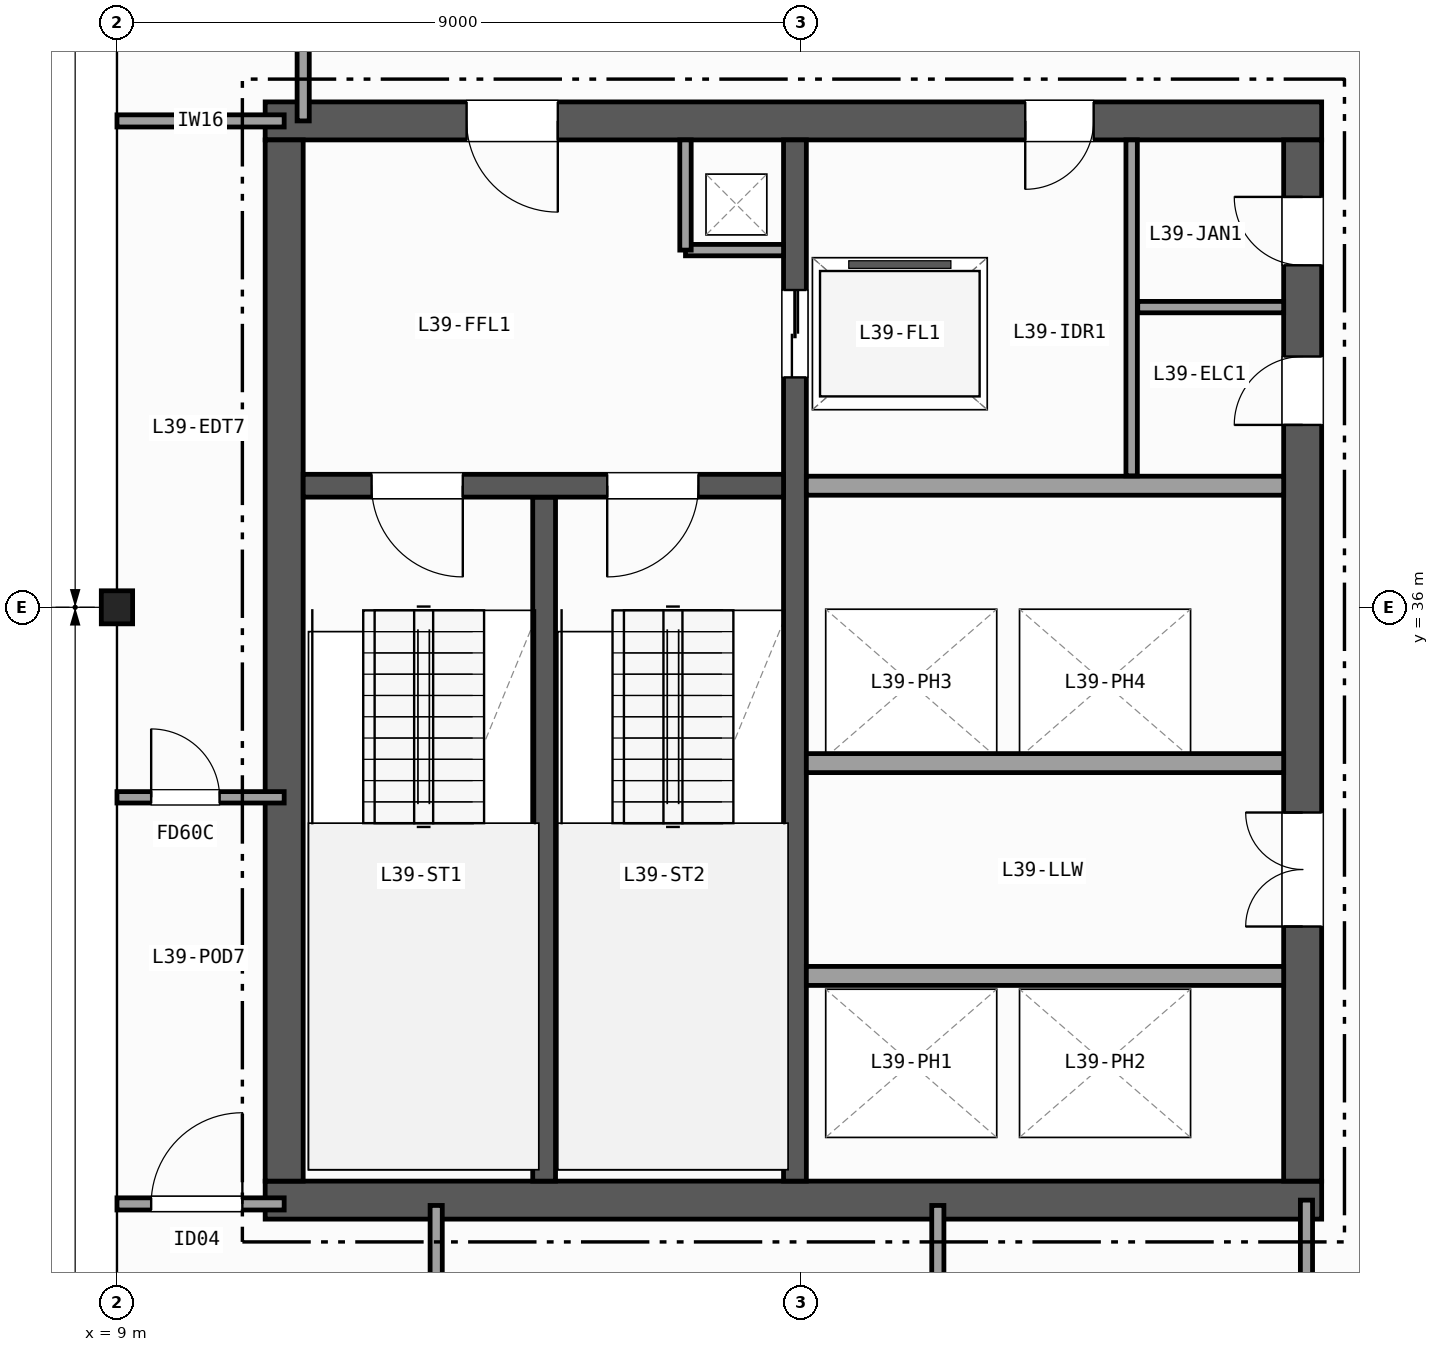
"""IFC4 building model, lengths in metres.
Left out: names, types, materials, properties, quantities, classifications, styles, units other than length and angle.
Written with IfcOpenShell. Run it as: python <this file> out.ifc"""

import sys

from ifc_helpers import new_model, si_unit, direction, frame, frame_2d, origin, origin_2d, place, context, subcontext, project, spatial, rectangle, i_section, extrude, element, fill, save


model = new_model("IFC4")
c1 = context("Model", 3, precision=1e-05, world=origin(), true_north=direction((0.0, 1.0)))
c2 = subcontext(c1, "Body", "Model", "MODEL_VIEW")
j1 = project(units=[si_unit("LENGTHUNIT", "METRE"), si_unit("PLANEANGLEUNIT", "RADIAN")], contexts=[c1])
p1 = place(None, origin())
s1 = spatial("IfcSite", under=j1, at=p1, CompositionType="ELEMENT")
p2 = place(p1, origin())
s2 = spatial("IfcBuilding", under=s1, at=p2, CompositionType="ELEMENT")
p3 = place(p2, frame((0.0, 0.0, 158.1)))
s3 = spatial("IfcBuildingStorey", under=s2, at=p3, CompositionType="ELEMENT", Elevation=158.1)
p4 = place(p3, frame((9.0, 36.0, 0.0), z_axis=(0.0, 0.0, 1.0), x_axis=(1.0, 0.0, 0.0)))
e1 = element("IfcColumn", 1, at=p4, inside=s3, PredefinedType="COLUMN", context=c2, shape_type="SweptSolid", body=[
    extrude(i_section(OverallWidth=0.412, OverallDepth=0.435, WebThickness=0.036, FlangeThickness=0.057, FilletRadius=0.015, at=origin_2d()), origin(), (0.0, 0.0, 1.0), 3.7),
])
p5 = place(p3, frame((10.95, 28.2, 0.0), z_axis=(0.0, 0.0, 1.0), x_axis=(1.0, 0.0, 0.0)))
e2 = element("IfcWall", 2, at=p5, inside=s3, PredefinedType="SHEAR", context=c2, shape_type="SweptSolid", body=[
    extrude(rectangle(XDim=13.9, YDim=0.5, at=frame_2d((6.95, 0.0))), origin(), (0.0, 0.0, 1.0), 3.42),
])
p6 = place(p3, frame((24.85, 42.4, 0.0), z_axis=(0.0, 0.0, 1.0), x_axis=(-1.0, 0.0, 0.0)))
e3 = element("IfcWall", 3, at=p6, inside=s3, PredefinedType="SHEAR", context=c2, shape_type="SweptSolid", body=[
    extrude(rectangle(XDim=13.9, YDim=0.5, at=frame_2d((6.95, 0.0))), origin(), (0.0, 0.0, 1.0), 3.42),
])
p7 = place(p6, frame((10.05, 0.0, 0.0)))
e4 = element("IfcOpeningElement", 4, at=p7, cuts=e3, PredefinedType="OPENING", context=c2, shape_type="SweptSolid", body=[
    extrude(rectangle(XDim=1.2, YDim=2.15, at=frame_2d((0.6, 1.075))), frame((0.0, 0.26, 0.0), z_axis=(0.0, -1.0, 0.0), x_axis=(1.0, 0.0, 0.0)), (0.0, 0.0, 1.0), 0.52),
])
p8 = place(p6, frame((3.0, 0.0, 0.0)))
e5 = element("IfcOpeningElement", 5, at=p8, cuts=e3, PredefinedType="OPENING", context=c2, shape_type="SweptSolid", body=[
    extrude(rectangle(XDim=0.9, YDim=2.1, at=frame_2d((0.45, 1.05))), frame((0.0, 0.26, 0.0), z_axis=(0.0, -1.0, 0.0), x_axis=(1.0, 0.0, 0.0)), (0.0, 0.0, 1.0), 0.52),
])
p9 = place(p3, frame((11.2, 42.15, 0.0), z_axis=(0.0, 0.0, 1.0), x_axis=(0.0, -1.0, 0.0)))
e6 = element("IfcWall", 6, at=p9, inside=s3, PredefinedType="SHEAR", context=c2, shape_type="SweptSolid", body=[
    extrude(rectangle(XDim=13.7, YDim=0.5, at=frame_2d((6.85, 0.0))), origin(), (0.0, 0.0, 1.0), 3.42),
])
p10 = place(p3, frame((24.6, 28.45, 0.0), z_axis=(0.0, 0.0, 1.0), x_axis=(0.0, 1.0, 0.0)))
e7 = element("IfcWall", 7, at=p10, inside=s3, PredefinedType="SHEAR", context=c2, shape_type="SweptSolid", body=[
    extrude(rectangle(XDim=13.7, YDim=0.5, at=frame_2d((6.85, 0.0))), origin(), (0.0, 0.0, 1.0), 3.42),
])
p11 = place(p10, frame((3.35, 0.0, 0.0)))
e8 = element("IfcOpeningElement", 8, at=p11, cuts=e7, PredefinedType="OPENING", context=c2, shape_type="SweptSolid", body=[
    extrude(rectangle(XDim=1.5, YDim=2.2, at=frame_2d((0.75, 1.1))), frame((0.0, 0.26, 0.0), z_axis=(0.0, -1.0, 0.0), x_axis=(1.0, 0.0, 0.0)), (0.0, 0.0, 1.0), 0.52),
])
p12 = place(p10, frame((9.95, 0.0, 0.0)))
e9 = element("IfcOpeningElement", 9, at=p12, cuts=e7, PredefinedType="OPENING", context=c2, shape_type="SweptSolid", body=[
    extrude(rectangle(XDim=0.9, YDim=2.1, at=frame_2d((0.45, 1.05))), frame((0.0, 0.26, 0.0), z_axis=(0.0, -1.0, 0.0), x_axis=(1.0, 0.0, 0.0)), (0.0, 0.0, 1.0), 0.52),
])
p13 = place(p10, frame((12.05, 0.0, 0.0)))
e10 = element("IfcOpeningElement", 10, at=p13, cuts=e7, PredefinedType="OPENING", context=c2, shape_type="SweptSolid", body=[
    extrude(rectangle(XDim=0.9, YDim=2.1, at=frame_2d((0.45, 1.05))), frame((0.0, 0.26, 0.0), z_axis=(0.0, -1.0, 0.0), x_axis=(1.0, 0.0, 0.0)), (0.0, 0.0, 1.0), 0.52),
])
p14 = place(p3, frame((14.62, 28.45, 0.0), z_axis=(0.0, 0.0, 1.0), x_axis=(0.0, 1.0, 0.0)))
e11 = element("IfcWall", 11, at=p14, inside=s3, PredefinedType="SHEAR", context=c2, shape_type="SweptSolid", body=[
    extrude(rectangle(XDim=9.0, YDim=0.3, at=frame_2d((4.5, 0.0))), origin(), (0.0, 0.0, 1.0), 3.42),
])
p15 = place(p3, frame((17.92, 42.15, 0.0), z_axis=(0.0, 0.0, 1.0), x_axis=(0.0, -1.0, 0.0)))
e12 = element("IfcWall", 12, at=p15, inside=s3, PredefinedType="SHEAR", context=c2, shape_type="SweptSolid", body=[
    extrude(rectangle(XDim=13.7, YDim=0.3, at=frame_2d((6.85, 0.0))), origin(), (0.0, 0.0, 1.0), 3.42),
])
p16 = place(p15, frame((1.975, 0.0, 0.0)))
e13 = element("IfcOpeningElement", 13, at=p16, cuts=e12, PredefinedType="OPENING", context=c2, shape_type="SweptSolid", body=[
    extrude(rectangle(XDim=1.15, YDim=2.15, at=frame_2d((0.575, 1.075))), frame((0.0, 0.16, 0.0), z_axis=(0.0, -1.0, 0.0), x_axis=(1.0, 0.0, 0.0)), (0.0, 0.0, 1.0), 0.32),
])
p17 = place(p3, frame((17.77, 37.6, 0.0), z_axis=(0.0, 0.0, 1.0), x_axis=(-1.0, 0.0, 0.0)))
e14 = element("IfcWall", 14, at=p17, inside=s3, PredefinedType="SHEAR", context=c2, shape_type="SweptSolid", body=[
    extrude(rectangle(XDim=6.32, YDim=0.3, at=frame_2d((3.16, 0.0))), origin(), (0.0, 0.0, 1.0), 3.42),
])
p18 = place(p17, frame((4.22, 0.0, 0.0)))
e15 = element("IfcOpeningElement", 15, at=p18, cuts=e14, PredefinedType="OPENING", context=c2, shape_type="SweptSolid", body=[
    extrude(rectangle(XDim=1.2, YDim=2.15, at=frame_2d((0.6, 1.075))), frame((0.0, 0.16, 0.0), z_axis=(0.0, -1.0, 0.0), x_axis=(1.0, 0.0, 0.0)), (0.0, 0.0, 1.0), 0.32),
])
p19 = place(p17, frame((1.12, 0.0, 0.0)))
e16 = element("IfcOpeningElement", 16, at=p19, cuts=e14, PredefinedType="OPENING", context=c2, shape_type="SweptSolid", body=[
    extrude(rectangle(XDim=1.2, YDim=2.15, at=frame_2d((0.6, 1.075))), frame((0.0, 0.16, 0.0), z_axis=(0.0, -1.0, 0.0), x_axis=(1.0, 0.0, 0.0)), (0.0, 0.0, 1.0), 0.32),
])
p20 = place(p3, frame((16.48, 40.7, 0.0), z_axis=(0.0, 0.0, 1.0), x_axis=(1.0, 0.0, 0.0)))
e17 = element("IfcWall", 17, at=p20, inside=s3, PredefinedType="PARTITIONING", context=c2, shape_type="SweptSolid", body=[
    extrude(rectangle(XDim=1.29, YDim=0.15, at=frame_2d((0.645, 0.0))), origin(), (0.0, 0.0, 1.0), 3.42),
])
p21 = place(p3, frame((16.48, 40.7, 0.0), z_axis=(0.0, 0.0, 1.0), x_axis=(0.0, 1.0, 0.0)))
e18 = element("IfcWall", 18, at=p21, inside=s3, PredefinedType="PARTITIONING", context=c2, shape_type="SweptSolid", body=[
    extrude(rectangle(XDim=1.45, YDim=0.15, at=frame_2d((0.725, 0.0))), origin(), (0.0, 0.0, 1.0), 3.42),
])
for number, where, z_axis, x_axis in (
    (19, (18.07, 37.6, 0.0), (0.0, 0.0, 1.0), (1.0, 0.0, 0.0)),
    (20, (18.07, 31.15, 0.0), (0.0, 0.0, 1.0), (1.0, 0.0, 0.0)),
    (21, (24.35, 33.95, 0.0), (0.0, 0.0, 1.0), (-1.0, 0.0, 0.0)),
):
    element("IfcWall", number, at=place(p3, frame(where, z_axis=z_axis, x_axis=x_axis)), inside=s3, PredefinedType="PARTITIONING", context=c2, shape_type="SweptSolid", body=[
        extrude(rectangle(XDim=6.28, YDim=0.25, at=frame_2d((3.14, 0.0))), origin(), (0.0, 0.0, 1.0), 3.42),
    ])
p22 = place(p3, frame((22.35, 37.73, 0.0), z_axis=(0.0, 0.0, 1.0), x_axis=(0.0, 1.0, 0.0)))
e22 = element("IfcWall", 22, at=p22, inside=s3, PredefinedType="PARTITIONING", context=c2, shape_type="SweptSolid", body=[
    extrude(rectangle(XDim=4.42, YDim=0.15, at=frame_2d((2.21, 0.0))), origin(), (0.0, 0.0, 1.0), 3.42),
])
p23 = place(p3, frame((22.43, 39.95, 0.0), z_axis=(0.0, 0.0, 1.0), x_axis=(1.0, 0.0, 0.0)))
e23 = element("IfcWall", 23, at=p23, inside=s3, PredefinedType="PARTITIONING", context=c2, shape_type="SweptSolid", body=[
    extrude(rectangle(XDim=1.92, YDim=0.15, at=frame_2d((0.96, 0.0))), origin(), (0.0, 0.0, 1.0), 3.42),
])
p24 = place(p3, frame((9.0, 28.15, 0.0), z_axis=(0.0, 0.0, 1.0), x_axis=(1.0, 0.0, 0.0)))
e24 = element("IfcWall", 24, at=p24, inside=s3, PredefinedType="PARTITIONING", context=c2, shape_type="SweptSolid", body=[
    extrude(rectangle(XDim=2.2, YDim=0.16, at=frame_2d((1.1, 0.0))), origin(), (0.0, 0.0, 1.0), 2.634),
])
p25 = place(p24, frame((0.45, 0.0, 0.0)))
e25 = element("IfcOpeningElement", 25, at=p25, cuts=e24, PredefinedType="OPENING", context=c2, shape_type="SweptSolid", body=[
    extrude(rectangle(XDim=1.2, YDim=2.15, at=frame_2d((0.6, 1.075))), frame((0.0, 0.09, 0.0), z_axis=(0.0, -1.0, 0.0), x_axis=(1.0, 0.0, 0.0)), (0.0, 0.0, 1.0), 0.18),
])
p26 = place(p3, frame((9.0, 42.4, 0.0), z_axis=(0.0, 0.0, 1.0), x_axis=(1.0, 0.0, 0.0)))
e26 = element("IfcWall", 26, at=p26, inside=s3, PredefinedType="PARTITIONING", context=c2, shape_type="SweptSolid", body=[
    extrude(rectangle(XDim=2.2, YDim=0.16, at=frame_2d((1.1, 0.0))), origin(), (0.0, 0.0, 1.0), 2.634),
])
p27 = place(p3, frame((11.45, 42.4, 0.0), z_axis=(0.0, 0.0, 1.0), x_axis=(0.0, 1.0, 0.0)))
e27 = element("IfcWall", 27, at=p27, inside=s3, PredefinedType="PARTITIONING", context=c2, shape_type="SweptSolid", body=[
    extrude(rectangle(XDim=2.1, YDim=0.16, at=frame_2d((1.05, 0.0))), origin(), (0.0, 0.0, 1.0), 3.42),
])
p28 = place(p3, frame((9.0, 33.5, 0.0), z_axis=(0.0, 0.0, 1.0), x_axis=(1.0, 0.0, 0.0)))
e28 = element("IfcWall", 28, at=p28, inside=s3, PredefinedType="PARTITIONING", context=c2, shape_type="SweptSolid", body=[
    extrude(rectangle(XDim=2.2, YDim=0.15, at=frame_2d((1.1, 0.0))), origin(), (0.0, 0.0, 1.0), 2.634),
])
p29 = place(p28, frame((0.45, 0.0, 0.0)))
e29 = element("IfcOpeningElement", 29, at=p29, cuts=e28, PredefinedType="OPENING", context=c2, shape_type="SweptSolid", body=[
    extrude(rectangle(XDim=0.9, YDim=2.1, at=frame_2d((0.45, 1.05))), frame((0.0, 0.085, 0.0), z_axis=(0.0, -1.0, 0.0), x_axis=(1.0, 0.0, 0.0)), (0.0, 0.0, 1.0), 0.17),
])
p30 = place(p3, frame((24.65, 9.0, 0.0), z_axis=(0.0, 0.0, 1.0), x_axis=(0.0, 1.0, 0.0)))
e30 = element("IfcWall", 30, at=p30, inside=s3, PredefinedType="PARTITIONING", context=c2, shape_type="SweptSolid", body=[
    extrude(rectangle(XDim=19.2, YDim=0.16, at=frame_2d((9.6, 0.0))), origin(), (0.0, 0.0, 1.0), 2.634),
])
p31 = place(p30, frame((12.2, 0.0, 0.0)))
e31 = element("IfcOpeningElement", 31, at=p31, cuts=e30, PredefinedType="OPENING", context=c2, shape_type="SweptSolid", body=[
    extrude(rectangle(XDim=0.95, YDim=2.1, at=frame_2d((0.475, 1.05))), frame((0.0, 0.09, 0.0), z_axis=(0.0, -1.0, 0.0), x_axis=(1.0, 0.0, 0.0)), (0.0, 0.0, 1.0), 0.18),
])
p32 = place(p30, frame((4.2, 0.0, 0.0)))
e32 = element("IfcOpeningElement", 32, at=p32, cuts=e30, PredefinedType="OPENING", context=c2, shape_type="SweptSolid", body=[
    extrude(rectangle(XDim=1.0, YDim=2.1, at=frame_2d((0.5, 1.05))), frame((0.0, 0.09, 0.0), z_axis=(0.0, -1.0, 0.0), x_axis=(1.0, 0.0, 0.0)), (0.0, 0.0, 1.0), 0.18),
])
p33 = place(p3, frame((13.2, 18.0, 0.0), z_axis=(0.0, 0.0, 1.0), x_axis=(0.0, 1.0, 0.0)))
e33 = element("IfcWall", 33, at=p33, inside=s3, PredefinedType="PARTITIONING", context=c2, shape_type="SweptSolid", body=[
    extrude(rectangle(XDim=10.13, YDim=0.16, at=frame_2d((5.065, 0.0))), origin(), (0.0, 0.0, 1.0), 2.789),
])
p34 = place(p33, frame((2.5, 0.0, 0.0)))
e34 = element("IfcOpeningElement", 34, at=p34, cuts=e33, PredefinedType="OPENING", context=c2, shape_type="SweptSolid", body=[
    extrude(rectangle(XDim=1.05, YDim=2.15, at=frame_2d((0.525, 1.075))), frame((0.0, 0.09, 0.0), z_axis=(0.0, -1.0, 0.0), x_axis=(1.0, 0.0, 0.0)), (0.0, 0.0, 1.0), 0.18),
])
p35 = place(p3, frame((19.8, 18.0, 0.0), z_axis=(0.0, 0.0, 1.0), x_axis=(0.0, 1.0, 0.0)))
e35 = element("IfcWall", 35, at=p35, inside=s3, PredefinedType="PARTITIONING", context=c2, shape_type="SweptSolid", body=[
    extrude(rectangle(XDim=10.13, YDim=0.16, at=frame_2d((5.065, 0.0))), origin(), (0.0, 0.0, 1.0), 2.789),
])
p36 = place(p35, frame((2.5, 0.0, 0.0)))
e36 = element("IfcOpeningElement", 36, at=p36, cuts=e35, PredefinedType="OPENING", context=c2, shape_type="SweptSolid", body=[
    extrude(rectangle(XDim=1.2, YDim=2.15, at=frame_2d((0.6, 1.075))), frame((0.0, 0.09, 0.0), z_axis=(0.0, -1.0, 0.0), x_axis=(1.0, 0.0, 0.0)), (0.0, 0.0, 1.0), 0.18),
])
p37 = place(p18, origin())
e37 = element("IfcDoor", 37, at=p37, inside=s3, OperationType="SINGLE_SWING_LEFT", PredefinedType="DOOR", context=c2, shape_type="SweptSolid", body=[
    extrude(rectangle(XDim=1.2, YDim=2.15, at=frame_2d((0.6, 1.075))), frame((0.0, 0.025, 0.0), z_axis=(0.0, -1.0, 0.0), x_axis=(1.0, 0.0, 0.0)), (0.0, 0.0, 1.0), 0.05),
])
fill(e15, e37)
p38 = place(p19, origin())
e38 = element("IfcDoor", 38, at=p38, inside=s3, OperationType="SINGLE_SWING_RIGHT", PredefinedType="DOOR", context=c2, shape_type="SweptSolid", body=[
    extrude(rectangle(XDim=1.2, YDim=2.15, at=frame_2d((0.6, 1.075))), frame((0.0, 0.025, 0.0), z_axis=(0.0, -1.0, 0.0), x_axis=(1.0, 0.0, 0.0)), (0.0, 0.0, 1.0), 0.05),
])
fill(e16, e38)
p39 = place(p11, origin())
e39 = element("IfcDoor", 39, at=p39, inside=s3, OperationType="DOUBLE_DOOR_SINGLE_SWING", PredefinedType="DOOR", context=c2, shape_type="SweptSolid", body=[
    extrude(rectangle(XDim=1.5, YDim=2.2, at=frame_2d((0.75, 1.1))), frame((0.0, 0.025, 0.0), z_axis=(0.0, -1.0, 0.0), x_axis=(1.0, 0.0, 0.0)), (0.0, 0.0, 1.0), 0.05),
])
fill(e8, e39)
p40 = place(p7, origin())
e40 = element("IfcDoor", 40, at=p40, inside=s3, OperationType="SINGLE_SWING_LEFT", PredefinedType="DOOR", context=c2, shape_type="SweptSolid", body=[
    extrude(rectangle(XDim=1.2, YDim=2.15, at=frame_2d((0.6, 1.075))), frame((0.0, 0.025, 0.0), z_axis=(0.0, -1.0, 0.0), x_axis=(1.0, 0.0, 0.0)), (0.0, 0.0, 1.0), 0.05),
])
fill(e4, e40)
p41 = place(p12, origin())
e41 = element("IfcDoor", 41, at=p41, inside=s3, OperationType="SINGLE_SWING_LEFT", PredefinedType="DOOR", context=c2, shape_type="SweptSolid", body=[
    extrude(rectangle(XDim=0.9, YDim=2.1, at=frame_2d((0.45, 1.05))), frame((0.0, 0.025, 0.0), z_axis=(0.0, -1.0, 0.0), x_axis=(1.0, 0.0, 0.0)), (0.0, 0.0, 1.0), 0.05),
])
fill(e9, e41)
p42 = place(p8, origin())
e42 = element("IfcDoor", 42, at=p42, inside=s3, OperationType="SINGLE_SWING_RIGHT", PredefinedType="DOOR", context=c2, shape_type="SweptSolid", body=[
    extrude(rectangle(XDim=0.9, YDim=2.1, at=frame_2d((0.45, 1.05))), frame((0.0, 0.025, 0.0), z_axis=(0.0, -1.0, 0.0), x_axis=(1.0, 0.0, 0.0)), (0.0, 0.0, 1.0), 0.05),
])
fill(e5, e42)
p43 = place(p13, origin())
e43 = element("IfcDoor", 43, at=p43, inside=s3, OperationType="SINGLE_SWING_RIGHT", PredefinedType="DOOR", context=c2, shape_type="SweptSolid", body=[
    extrude(rectangle(XDim=0.9, YDim=2.1, at=frame_2d((0.45, 1.05))), frame((0.0, 0.025, 0.0), z_axis=(0.0, -1.0, 0.0), x_axis=(1.0, 0.0, 0.0)), (0.0, 0.0, 1.0), 0.05),
])
fill(e10, e43)
p44 = place(p16, origin())
e44 = element("IfcDoor", 44, at=p44, inside=s3, OperationType="DOUBLE_DOOR_SLIDING", PredefinedType="DOOR", context=c2, shape_type="SweptSolid", body=[
    extrude(rectangle(XDim=1.15, YDim=2.15, at=frame_2d((0.575, 1.075))), frame((0.0, 0.025, 0.0), z_axis=(0.0, -1.0, 0.0), x_axis=(1.0, 0.0, 0.0)), (0.0, 0.0, 1.0), 0.05),
])
fill(e13, e44)
p45 = place(p25, origin())
e45 = element("IfcDoor", 45, at=p45, inside=s3, OperationType="SINGLE_SWING_RIGHT", PredefinedType="DOOR", context=c2, shape_type="SweptSolid", body=[
    extrude(rectangle(XDim=1.2, YDim=2.15, at=frame_2d((0.6, 1.075))), frame((0.0, 0.025, 0.0), z_axis=(0.0, -1.0, 0.0), x_axis=(1.0, 0.0, 0.0)), (0.0, 0.0, 1.0), 0.05),
])
fill(e25, e45)
p46 = place(p29, origin())
e46 = element("IfcDoor", 46, at=p46, inside=s3, OperationType="SINGLE_SWING_LEFT", PredefinedType="DOOR", context=c2, shape_type="SweptSolid", body=[
    extrude(rectangle(XDim=0.9, YDim=2.1, at=frame_2d((0.45, 1.05))), frame((0.0, 0.025, 0.0), z_axis=(0.0, -1.0, 0.0), x_axis=(1.0, 0.0, 0.0)), (0.0, 0.0, 1.0), 0.05),
])
fill(e29, e46)
save(model, sys.argv[1])
